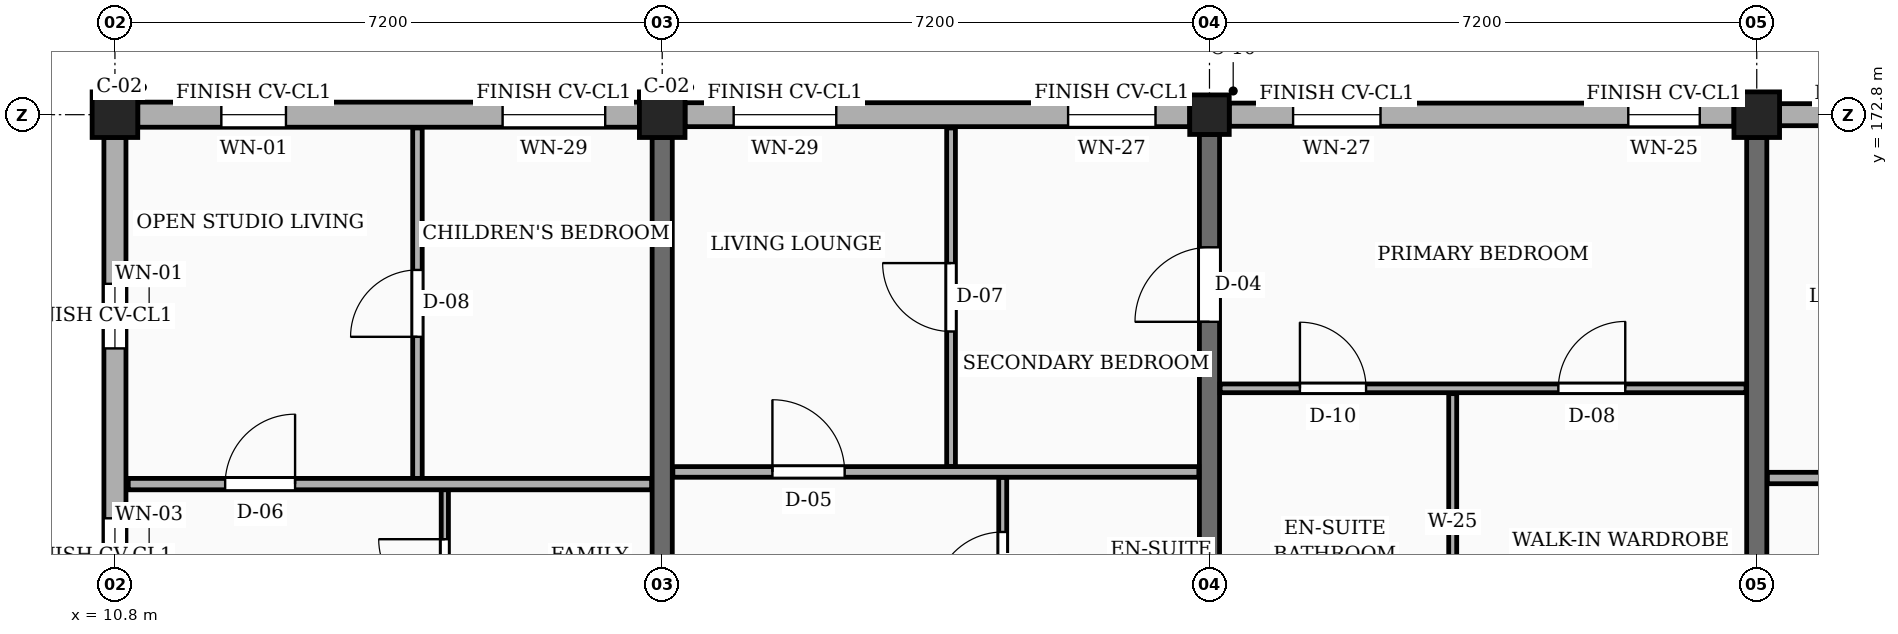
"""IFC4 building model, lengths in metres.
Left out: names, types, materials, properties, quantities, classifications, styles, units other than length and angle.
Written with IfcOpenShell. Run it as: python <this file> out.ifc"""

import sys

from ifc_helpers import new_model, si_unit, direction, frame, frame_2d, origin, origin_2d, place, context, subcontext, project, spatial, rectangle, circle, extrude, element, fill, save


model = new_model("IFC4")
c1 = context("Model", 3, precision=1e-05, world=origin(), true_north=direction((0.0, 1.0)))
c2 = subcontext(c1, "Body", "Model", "MODEL_VIEW")
j1 = project(units=[si_unit("LENGTHUNIT", "METRE"), si_unit("PLANEANGLEUNIT", "RADIAN")], contexts=[c1])
p1 = place(None, origin())
s1 = spatial("IfcSite", under=j1, at=p1, CompositionType="ELEMENT")
p2 = place(p1, origin())
s2 = spatial("IfcBuilding", under=s1, at=p2, CompositionType="ELEMENT")
p3 = place(p2, origin())
s3 = spatial("IfcBuildingStorey", under=s2, at=p3, CompositionType="ELEMENT", Elevation=0.0)
for number, where, z_axis, x_axis in (
    (1, (10.8, 172.8, 0.0), (0.0, 0.0, 1.0), (1.0, 0.0, 0.0)),
    (2, (18.0, 172.8, 0.0), (0.0, 0.0, 1.0), (1.0, 0.0, 0.0)),
):
    element("IfcColumn", number, at=place(p3, frame(where, z_axis=z_axis, x_axis=x_axis)), inside=s3, PredefinedType="COLUMN", context=c2, shape_type="SweptSolid", body=[
        extrude(rectangle(XDim=0.6, YDim=0.6, at=origin_2d()), origin(), (0.0, 0.0, 1.0), 4.5),
    ])
p4 = place(p3, frame((25.2, 172.8, 0.0), z_axis=(0.0, 0.0, 1.0), x_axis=(1.0, 0.0, 0.0)))
e3 = element("IfcColumn", 3, at=p4, inside=s3, PredefinedType="COLUMN", context=c2, shape_type="SweptSolid", body=[
    extrude(circle(Radius=0.26, at=origin_2d()), origin(), (0.0, 0.0, 1.0), 4.5),
])
p5 = place(p3, frame((32.4, 172.8, 0.0), z_axis=(0.0, 0.0, 1.0), x_axis=(1.0, 0.0, 0.0)))
e4 = element("IfcColumn", 4, at=p5, inside=s3, PredefinedType="COLUMN", context=c2, shape_type="SweptSolid", body=[
    extrude(rectangle(XDim=0.6, YDim=0.6, at=origin_2d()), origin(), (0.0, 0.0, 1.0), 4.5),
])
p6 = place(p3, frame((18.0, 165.925, 0.0), z_axis=(0.0, 0.0, 1.0), x_axis=(0.0, 1.0, 0.0)))
e5 = element("IfcWall", 5, at=p6, inside=s3, PredefinedType="SOLIDWALL", context=c2, shape_type="SweptSolid", body=[
    extrude(rectangle(XDim=6.575, YDim=0.265, at=frame_2d((3.288, 0.0))), origin(), (0.0, 0.0, 1.0), 3.535),
])
p7 = place(p3, frame((25.2, 165.925, 0.0), z_axis=(0.0, 0.0, 1.0), x_axis=(0.0, 1.0, 0.0)))
e6 = element("IfcWall", 6, at=p7, inside=s3, PredefinedType="SOLIDWALL", context=c2, shape_type="SweptSolid", body=[
    extrude(rectangle(XDim=6.615, YDim=0.265, at=frame_2d((3.308, 0.0))), origin(), (0.0, 0.0, 1.0), 3.535),
])
p8 = place(p7, frame((4.15, 0.0, 0.0)))
e7 = element("IfcOpeningElement", 7, at=p8, cuts=e6, PredefinedType="OPENING", context=c2, shape_type="SweptSolid", body=[
    extrude(rectangle(XDim=0.98, YDim=2.12, at=frame_2d((0.49, 1.06))), frame((0.0, 0.143, 0.0), z_axis=(0.0, -1.0, 0.0), x_axis=(1.0, 0.0, 0.0)), (0.0, 0.0, 1.0), 0.285),
])
p9 = place(p3, frame((32.4, 165.925, 0.0), z_axis=(0.0, 0.0, 1.0), x_axis=(0.0, 1.0, 0.0)))
e8 = element("IfcWall", 8, at=p9, inside=s3, PredefinedType="SOLIDWALL", context=c2, shape_type="SweptSolid", body=[
    extrude(rectangle(XDim=6.575, YDim=0.265, at=frame_2d((3.288, 0.0))), origin(), (0.0, 0.0, 1.0), 3.535),
])
p10 = place(p3, frame((39.3, 172.8, 0.0), z_axis=(0.0, 0.0, 1.0), x_axis=(-1.0, 0.0, 0.0)))
e9 = element("IfcWall", 9, at=p10, inside=s3, PredefinedType="SOLIDWALL", context=c2, shape_type="SweptSolid", body=[
    extrude(rectangle(XDim=6.6, YDim=0.29, at=frame_2d((3.3, 0.0))), origin(), (0.0, 0.0, 1.0), 3.805),
])
p11 = place(p10, frame((0.45, 0.0, 0.78)))
e10 = element("IfcOpeningElement", 10, at=p11, cuts=e9, PredefinedType="OPENING", context=c2, shape_type="SweptSolid", body=[
    extrude(rectangle(XDim=1.38, YDim=1.36, at=frame_2d((0.69, 0.68))), frame((0.0, 0.155, 0.0), z_axis=(0.0, -1.0, 0.0), x_axis=(1.0, 0.0, 0.0)), (0.0, 0.0, 1.0), 0.31),
])
p12 = place(p10, frame((4.65, 0.0, 0.78)))
e11 = element("IfcOpeningElement", 11, at=p12, cuts=e9, PredefinedType="OPENING", context=c2, shape_type="SweptSolid", body=[
    extrude(rectangle(XDim=0.94, YDim=1.44, at=frame_2d((0.47, 0.72))), frame((0.0, 0.155, 0.0), z_axis=(0.0, -1.0, 0.0), x_axis=(1.0, 0.0, 0.0)), (0.0, 0.0, 1.0), 0.31),
])
p13 = place(p3, frame((32.1, 172.8, 0.0), z_axis=(0.0, 0.0, 1.0), x_axis=(-1.0, 0.0, 0.0)))
e12 = element("IfcWall", 12, at=p13, inside=s3, PredefinedType="SOLIDWALL", context=c2, shape_type="SweptSolid", body=[
    extrude(rectangle(XDim=6.64, YDim=0.305, at=frame_2d((3.32, 0.0))), origin(), (0.0, 0.0, 1.0), 3.805),
])
p14 = place(p13, frame((0.45, 0.0, 0.78)))
e13 = element("IfcOpeningElement", 13, at=p14, cuts=e12, PredefinedType="OPENING", context=c2, shape_type="SweptSolid", body=[
    extrude(rectangle(XDim=0.94, YDim=1.44, at=frame_2d((0.47, 0.72))), frame((0.0, 0.163, 0.0), z_axis=(0.0, -1.0, 0.0), x_axis=(1.0, 0.0, 0.0)), (0.0, 0.0, 1.0), 0.325),
])
p15 = place(p13, frame((4.65, 0.0, 0.78)))
e14 = element("IfcOpeningElement", 14, at=p15, cuts=e12, PredefinedType="OPENING", context=c2, shape_type="SweptSolid", body=[
    extrude(rectangle(XDim=1.15, YDim=1.44, at=frame_2d((0.575, 0.72))), frame((0.0, 0.163, 0.0), z_axis=(0.0, -1.0, 0.0), x_axis=(1.0, 0.0, 0.0)), (0.0, 0.0, 1.0), 0.325),
])
p16 = place(p3, frame((24.94, 172.8, 0.0), z_axis=(0.0, 0.0, 1.0), x_axis=(-1.0, 0.0, 0.0)))
e15 = element("IfcWall", 15, at=p16, inside=s3, PredefinedType="SOLIDWALL", context=c2, shape_type="SweptSolid", body=[
    extrude(rectangle(XDim=6.64, YDim=0.315, at=frame_2d((3.32, 0.0))), origin(), (0.0, 0.0, 1.0), 3.805),
])
p17 = place(p16, frame((0.45, 0.0, 0.78)))
e16 = element("IfcOpeningElement", 16, at=p17, cuts=e15, PredefinedType="OPENING", context=c2, shape_type="SweptSolid", body=[
    extrude(rectangle(XDim=1.15, YDim=1.44, at=frame_2d((0.575, 0.72))), frame((0.0, 0.167, 0.0), z_axis=(0.0, -1.0, 0.0), x_axis=(1.0, 0.0, 0.0)), (0.0, 0.0, 1.0), 0.335),
])
p18 = place(p16, frame((4.65, 0.0, 0.78)))
e17 = element("IfcOpeningElement", 17, at=p18, cuts=e15, PredefinedType="OPENING", context=c2, shape_type="SweptSolid", body=[
    extrude(rectangle(XDim=1.35, YDim=1.44, at=frame_2d((0.675, 0.72))), frame((0.0, 0.167, 0.0), z_axis=(0.0, -1.0, 0.0), x_axis=(1.0, 0.0, 0.0)), (0.0, 0.0, 1.0), 0.335),
])
p19 = place(p3, frame((17.7, 172.8, 0.0), z_axis=(0.0, 0.0, 1.0), x_axis=(-1.0, 0.0, 0.0)))
e18 = element("IfcWall", 18, at=p19, inside=s3, PredefinedType="SOLIDWALL", context=c2, shape_type="SweptSolid", body=[
    extrude(rectangle(XDim=6.6, YDim=0.33, at=frame_2d((3.3, 0.0))), origin(), (0.0, 0.0, 1.0), 3.805),
])
p20 = place(p19, frame((0.45, 0.0, 0.78)))
e19 = element("IfcOpeningElement", 19, at=p20, cuts=e18, PredefinedType="OPENING", context=c2, shape_type="SweptSolid", body=[
    extrude(rectangle(XDim=1.35, YDim=1.44, at=frame_2d((0.675, 0.72))), frame((0.0, 0.175, 0.0), z_axis=(0.0, -1.0, 0.0), x_axis=(1.0, 0.0, 0.0)), (0.0, 0.0, 1.0), 0.35),
])
p21 = place(p19, frame((4.65, 0.0, 0.78)))
e20 = element("IfcOpeningElement", 20, at=p21, cuts=e18, PredefinedType="OPENING", context=c2, shape_type="SweptSolid", body=[
    extrude(rectangle(XDim=0.85, YDim=1.15, at=frame_2d((0.425, 0.575))), frame((0.0, 0.175, 0.0), z_axis=(0.0, -1.0, 0.0), x_axis=(1.0, 0.0, 0.0)), (0.0, 0.0, 1.0), 0.35),
])
p22 = place(p3, frame((10.8, 172.5, 0.0), z_axis=(0.0, 0.0, 1.0), x_axis=(0.0, -1.0, 0.0)))
e21 = element("IfcWall", 21, at=p22, inside=s3, PredefinedType="SOLIDWALL", context=c2, shape_type="SweptSolid", body=[
    extrude(rectangle(XDim=6.6, YDim=0.29, at=frame_2d((3.3, 0.0))), origin(), (0.0, 0.0, 1.0), 3.805),
])
p23 = place(p22, frame((1.925, 0.0, 0.78)))
e22 = element("IfcOpeningElement", 22, at=p23, cuts=e21, PredefinedType="OPENING", context=c2, shape_type="SweptSolid", body=[
    extrude(rectangle(XDim=0.85, YDim=1.15, at=frame_2d((0.425, 0.575))), frame((0.0, 0.155, 0.0), z_axis=(0.0, -1.0, 0.0), x_axis=(1.0, 0.0, 0.0)), (0.0, 0.0, 1.0), 0.31),
])
p24 = place(p22, frame((5.01, 0.0, 0.78)))
e23 = element("IfcOpeningElement", 23, at=p24, cuts=e21, PredefinedType="OPENING", context=c2, shape_type="SweptSolid", body=[
    extrude(rectangle(XDim=1.0, YDim=1.15, at=frame_2d((0.5, 0.575))), frame((0.0, 0.155, 0.0), z_axis=(0.0, -1.0, 0.0), x_axis=(1.0, 0.0, 0.0)), (0.0, 0.0, 1.0), 0.31),
])
p25 = place(p3, frame((14.78, 168.01, 0.0), z_axis=(0.0, 0.0, 1.0), x_axis=(0.0, 1.0, 0.0)))
e24 = element("IfcWall", 24, at=p25, inside=s3, PredefinedType="PARTITIONING", context=c2, shape_type="SweptSolid", body=[
    extrude(rectangle(XDim=4.615, YDim=0.125, at=frame_2d((2.308, 0.0))), origin(), (0.0, 0.0, 1.0), 3.67),
])
p26 = place(p25, frame((1.867, 0.0, 0.0)))
e25 = element("IfcOpeningElement", 25, at=p26, cuts=e24, PredefinedType="OPENING", context=c2, shape_type="SweptSolid", body=[
    extrude(rectangle(XDim=0.88, YDim=2.08, at=frame_2d((0.44, 1.04))), frame((0.0, 0.073, 0.0), z_axis=(0.0, -1.0, 0.0), x_axis=(1.0, 0.0, 0.0)), (0.0, 0.0, 1.0), 0.145),
])
p27 = place(p3, frame((15.14, 165.69, 0.0), z_axis=(0.0, 0.0, 1.0), x_axis=(0.0, 1.0, 0.0)))
e26 = element("IfcWall", 26, at=p27, inside=s3, PredefinedType="PARTITIONING", context=c2, shape_type="SweptSolid", body=[
    extrude(rectangle(XDim=2.18, YDim=0.095, at=frame_2d((1.09, 0.0))), origin(), (0.0, 0.0, 1.0), 3.67),
])
p28 = place(p27, frame((0.655, 0.0, 0.0)))
e27 = element("IfcOpeningElement", 27, at=p28, cuts=e26, PredefinedType="OPENING", context=c2, shape_type="SweptSolid", body=[
    extrude(rectangle(XDim=0.87, YDim=2.05, at=frame_2d((0.435, 1.025))), frame((0.0, 0.058, 0.0), z_axis=(0.0, -1.0, 0.0), x_axis=(1.0, 0.0, 0.0)), (0.0, 0.0, 1.0), 0.115),
])
p29 = place(p3, frame((10.975, 167.94, 0.0), z_axis=(0.0, 0.0, 1.0), x_axis=(1.0, 0.0, 0.0)))
e28 = element("IfcWall", 28, at=p29, inside=s3, PredefinedType="PARTITIONING", context=c2, shape_type="SweptSolid", body=[
    extrude(rectangle(XDim=6.885, YDim=0.15, at=frame_2d((3.442, 0.0))), origin(), (0.0, 0.0, 1.0), 3.67),
])
p30 = place(p29, frame((1.275, 0.0, 0.0)))
e29 = element("IfcOpeningElement", 29, at=p30, cuts=e28, PredefinedType="OPENING", context=c2, shape_type="SweptSolid", body=[
    extrude(rectangle(XDim=0.92, YDim=2.1, at=frame_2d((0.46, 1.05))), frame((0.0, 0.085, 0.0), z_axis=(0.0, -1.0, 0.0), x_axis=(1.0, 0.0, 0.0)), (0.0, 0.0, 1.0), 0.17),
])
p31 = place(p3, frame((21.8, 168.17, 0.0), z_axis=(0.0, 0.0, 1.0), x_axis=(0.0, 1.0, 0.0)))
e30 = element("IfcWall", 30, at=p31, inside=s3, PredefinedType="PARTITIONING", context=c2, shape_type="SweptSolid", body=[
    extrude(rectangle(XDim=4.455, YDim=0.115, at=frame_2d((2.228, 0.0))), origin(), (0.0, 0.0, 1.0), 3.67),
])
p32 = place(p31, frame((1.778, 0.0, 0.0)))
e31 = element("IfcOpeningElement", 31, at=p32, cuts=e30, PredefinedType="OPENING", context=c2, shape_type="SweptSolid", body=[
    extrude(rectangle(XDim=0.9, YDim=2.1, at=frame_2d((0.45, 1.05))), frame((0.0, 0.067, 0.0), z_axis=(0.0, -1.0, 0.0), x_axis=(1.0, 0.0, 0.0)), (0.0, 0.0, 1.0), 0.135),
])
p33 = place(p3, frame((22.48, 165.69, 0.0), z_axis=(0.0, 0.0, 1.0), x_axis=(0.0, 1.0, 0.0)))
e32 = element("IfcWall", 32, at=p33, inside=s3, PredefinedType="PARTITIONING", context=c2, shape_type="SweptSolid", body=[
    extrude(rectangle(XDim=2.34, YDim=0.105, at=frame_2d((1.17, 0.0))), origin(), (0.0, 0.0, 1.0), 3.67),
])
p34 = place(p33, frame((0.72, 0.0, 0.0)))
e33 = element("IfcOpeningElement", 33, at=p34, cuts=e32, PredefinedType="OPENING", context=c2, shape_type="SweptSolid", body=[
    extrude(rectangle(XDim=0.9, YDim=2.05, at=frame_2d((0.45, 1.025))), frame((0.0, 0.062, 0.0), z_axis=(0.0, -1.0, 0.0), x_axis=(1.0, 0.0, 0.0)), (0.0, 0.0, 1.0), 0.125),
])
p35 = place(p3, frame((18.14, 168.1, 0.0), z_axis=(0.0, 0.0, 1.0), x_axis=(1.0, 0.0, 0.0)))
e34 = element("IfcWall", 34, at=p35, inside=s3, PredefinedType="PARTITIONING", context=c2, shape_type="SweptSolid", body=[
    extrude(rectangle(XDim=6.92, YDim=0.14, at=frame_2d((3.46, 0.0))), origin(), (0.0, 0.0, 1.0), 3.67),
])
p36 = place(p35, frame((1.31, 0.0, 0.0)))
e35 = element("IfcOpeningElement", 35, at=p36, cuts=e34, PredefinedType="OPENING", context=c2, shape_type="SweptSolid", body=[
    extrude(rectangle(XDim=0.95, YDim=2.1, at=frame_2d((0.475, 1.05))), frame((0.0, 0.08, 0.0), z_axis=(0.0, -1.0, 0.0), x_axis=(1.0, 0.0, 0.0)), (0.0, 0.0, 1.0), 0.16),
])
p37 = place(p3, frame((25.34, 169.2, 0.0), z_axis=(0.0, 0.0, 1.0), x_axis=(1.0, 0.0, 0.0)))
e36 = element("IfcWall", 36, at=p37, inside=s3, PredefinedType="PARTITIONING", context=c2, shape_type="SweptSolid", body=[
    extrude(rectangle(XDim=6.92, YDim=0.115, at=frame_2d((3.46, 0.0))), origin(), (0.0, 0.0, 1.0), 3.67),
])
p38 = place(p37, frame((1.05, 0.0, 0.0)))
e37 = element("IfcOpeningElement", 37, at=p38, cuts=e36, PredefinedType="OPENING", context=c2, shape_type="SweptSolid", body=[
    extrude(rectangle(XDim=0.87, YDim=2.05, at=frame_2d((0.435, 1.025))), frame((0.0, 0.067, 0.0), z_axis=(0.0, -1.0, 0.0), x_axis=(1.0, 0.0, 0.0)), (0.0, 0.0, 1.0), 0.135),
])
p39 = place(p37, frame((4.45, 0.0, 0.0)))
e38 = element("IfcOpeningElement", 38, at=p39, cuts=e36, PredefinedType="OPENING", context=c2, shape_type="SweptSolid", body=[
    extrude(rectangle(XDim=0.88, YDim=2.08, at=frame_2d((0.44, 1.04))), frame((0.0, 0.067, 0.0), z_axis=(0.0, -1.0, 0.0), x_axis=(1.0, 0.0, 0.0)), (0.0, 0.0, 1.0), 0.135),
])
p40 = place(p3, frame((28.4, 165.74, 0.0), z_axis=(0.0, 0.0, 1.0), x_axis=(0.0, 1.0, 0.0)))
e39 = element("IfcWall", 39, at=p40, inside=s3, PredefinedType="PARTITIONING", context=c2, shape_type="SweptSolid", body=[
    extrude(rectangle(XDim=3.39, YDim=0.105, at=frame_2d((1.695, 0.0))), origin(), (0.0, 0.0, 1.0), 3.67),
])
p41 = place(p3, frame((32.54, 168.02, 0.0), z_axis=(0.0, 0.0, 1.0), x_axis=(1.0, 0.0, 0.0)))
e40 = element("IfcWall", 40, at=p41, inside=s3, PredefinedType="PARTITIONING", context=c2, shape_type="SweptSolid", body=[
    extrude(rectangle(XDim=6.92, YDim=0.15, at=frame_2d((3.46, 0.0))), origin(), (0.0, 0.0, 1.0), 3.67),
])
p42 = place(p41, frame((1.31, 0.0, 0.0)))
e41 = element("IfcOpeningElement", 41, at=p42, cuts=e40, PredefinedType="OPENING", context=c2, shape_type="SweptSolid", body=[
    extrude(rectangle(XDim=0.92, YDim=2.1, at=frame_2d((0.46, 1.05))), frame((0.0, 0.085, 0.0), z_axis=(0.0, -1.0, 0.0), x_axis=(1.0, 0.0, 0.0)), (0.0, 0.0, 1.0), 0.17),
])
p43 = place(p14, origin())
e42 = element("IfcWindow", 42, at=p43, inside=s3, PartitioningType="SINGLE_PANEL", PredefinedType="WINDOW", context=c2, shape_type="SweptSolid", body=[
    extrude(rectangle(XDim=0.94, YDim=1.44, at=frame_2d((0.47, 0.72))), frame((0.0, 0.03, 0.0), z_axis=(0.0, -1.0, 0.0), x_axis=(1.0, 0.0, 0.0)), (0.0, 0.0, 1.0), 0.06),
])
fill(e13, e42)
p44 = place(p15, origin())
e43 = element("IfcWindow", 43, at=p44, inside=s3, PartitioningType="SINGLE_PANEL", PredefinedType="WINDOW", context=c2, shape_type="SweptSolid", body=[
    extrude(rectangle(XDim=1.15, YDim=1.44, at=frame_2d((0.575, 0.72))), frame((0.0, 0.03, 0.0), z_axis=(0.0, -1.0, 0.0), x_axis=(1.0, 0.0, 0.0)), (0.0, 0.0, 1.0), 0.06),
])
fill(e14, e43)
p45 = place(p17, origin())
e44 = element("IfcWindow", 44, at=p45, inside=s3, PartitioningType="SINGLE_PANEL", PredefinedType="WINDOW", context=c2, shape_type="SweptSolid", body=[
    extrude(rectangle(XDim=1.15, YDim=1.44, at=frame_2d((0.575, 0.72))), frame((0.0, 0.03, 0.0), z_axis=(0.0, -1.0, 0.0), x_axis=(1.0, 0.0, 0.0)), (0.0, 0.0, 1.0), 0.06),
])
fill(e16, e44)
p46 = place(p18, origin())
e45 = element("IfcWindow", 45, at=p46, inside=s3, PartitioningType="SINGLE_PANEL", PredefinedType="WINDOW", context=c2, shape_type="SweptSolid", body=[
    extrude(rectangle(XDim=1.35, YDim=1.44, at=frame_2d((0.675, 0.72))), frame((0.0, 0.03, 0.0), z_axis=(0.0, -1.0, 0.0), x_axis=(1.0, 0.0, 0.0)), (0.0, 0.0, 1.0), 0.06),
])
fill(e17, e45)
p47 = place(p20, origin())
e46 = element("IfcWindow", 46, at=p47, inside=s3, PartitioningType="SINGLE_PANEL", PredefinedType="WINDOW", context=c2, shape_type="SweptSolid", body=[
    extrude(rectangle(XDim=1.35, YDim=1.44, at=frame_2d((0.675, 0.72))), frame((0.0, 0.03, 0.0), z_axis=(0.0, -1.0, 0.0), x_axis=(1.0, 0.0, 0.0)), (0.0, 0.0, 1.0), 0.06),
])
fill(e19, e46)
p48 = place(p21, origin())
e47 = element("IfcWindow", 47, at=p48, inside=s3, PartitioningType="SINGLE_PANEL", PredefinedType="WINDOW", context=c2, shape_type="SweptSolid", body=[
    extrude(rectangle(XDim=0.85, YDim=1.15, at=frame_2d((0.425, 0.575))), frame((0.0, 0.03, 0.0), z_axis=(0.0, -1.0, 0.0), x_axis=(1.0, 0.0, 0.0)), (0.0, 0.0, 1.0), 0.06),
])
fill(e20, e47)
p49 = place(p23, origin())
e48 = element("IfcWindow", 48, at=p49, inside=s3, PartitioningType="SINGLE_PANEL", PredefinedType="WINDOW", context=c2, shape_type="SweptSolid", body=[
    extrude(rectangle(XDim=0.85, YDim=1.15, at=frame_2d((0.425, 0.575))), frame((0.0, 0.03, 0.0), z_axis=(0.0, -1.0, 0.0), x_axis=(1.0, 0.0, 0.0)), (0.0, 0.0, 1.0), 0.06),
])
fill(e22, e48)
p50 = place(p24, origin())
e49 = element("IfcWindow", 49, at=p50, inside=s3, PartitioningType="SINGLE_PANEL", PredefinedType="WINDOW", context=c2, shape_type="SweptSolid", body=[
    extrude(rectangle(XDim=1.0, YDim=1.15, at=frame_2d((0.5, 0.575))), frame((0.0, 0.03, 0.0), z_axis=(0.0, -1.0, 0.0), x_axis=(1.0, 0.0, 0.0)), (0.0, 0.0, 1.0), 0.06),
])
fill(e23, e49)
p51 = place(p26, origin())
e50 = element("IfcDoor", 50, at=p51, inside=s3, OperationType="SINGLE_SWING_LEFT", PredefinedType="DOOR", context=c2, shape_type="SweptSolid", body=[
    extrude(rectangle(XDim=0.88, YDim=2.08, at=frame_2d((0.44, 1.04))), frame((0.0, 0.025, 0.0), z_axis=(0.0, -1.0, 0.0), x_axis=(1.0, 0.0, 0.0)), (0.0, 0.0, 1.0), 0.05),
])
fill(e25, e50)
p52 = place(p28, origin())
e51 = element("IfcDoor", 51, at=p52, inside=s3, OperationType="SINGLE_SWING_RIGHT", PredefinedType="DOOR", context=c2, shape_type="SweptSolid", body=[
    extrude(rectangle(XDim=0.87, YDim=2.05, at=frame_2d((0.435, 1.025))), frame((0.0, 0.025, 0.0), z_axis=(0.0, -1.0, 0.0), x_axis=(1.0, 0.0, 0.0)), (0.0, 0.0, 1.0), 0.05),
])
fill(e27, e51)
p53 = place(p30, origin())
e52 = element("IfcDoor", 52, at=p53, inside=s3, OperationType="SINGLE_SWING_RIGHT", PredefinedType="DOOR", context=c2, shape_type="SweptSolid", body=[
    extrude(rectangle(XDim=0.92, YDim=2.1, at=frame_2d((0.46, 1.05))), frame((0.0, 0.025, 0.0), z_axis=(0.0, -1.0, 0.0), x_axis=(1.0, 0.0, 0.0)), (0.0, 0.0, 1.0), 0.05),
])
fill(e29, e52)
p54 = place(p32, origin())
e53 = element("IfcDoor", 53, at=p54, inside=s3, OperationType="SINGLE_SWING_RIGHT", PredefinedType="DOOR", context=c2, shape_type="SweptSolid", body=[
    extrude(rectangle(XDim=0.9, YDim=2.1, at=frame_2d((0.45, 1.05))), frame((0.0, 0.025, 0.0), z_axis=(0.0, -1.0, 0.0), x_axis=(1.0, 0.0, 0.0)), (0.0, 0.0, 1.0), 0.05),
])
fill(e31, e53)
p55 = place(p34, origin())
e54 = element("IfcDoor", 54, at=p55, inside=s3, OperationType="SINGLE_SWING_LEFT", PredefinedType="DOOR", context=c2, shape_type="SweptSolid", body=[
    extrude(rectangle(XDim=0.9, YDim=2.05, at=frame_2d((0.45, 1.025))), frame((0.0, 0.025, 0.0), z_axis=(0.0, -1.0, 0.0), x_axis=(1.0, 0.0, 0.0)), (0.0, 0.0, 1.0), 0.05),
])
fill(e33, e54)
p56 = place(p36, origin())
e55 = element("IfcDoor", 55, at=p56, inside=s3, OperationType="SINGLE_SWING_LEFT", PredefinedType="DOOR", context=c2, shape_type="SweptSolid", body=[
    extrude(rectangle(XDim=0.95, YDim=2.1, at=frame_2d((0.475, 1.05))), frame((0.0, 0.025, 0.0), z_axis=(0.0, -1.0, 0.0), x_axis=(1.0, 0.0, 0.0)), (0.0, 0.0, 1.0), 0.05),
])
fill(e35, e55)
p57 = place(p38, origin())
e56 = element("IfcDoor", 56, at=p57, inside=s3, OperationType="SINGLE_SWING_LEFT", PredefinedType="DOOR", context=c2, shape_type="SweptSolid", body=[
    extrude(rectangle(XDim=0.87, YDim=2.05, at=frame_2d((0.435, 1.025))), frame((0.0, 0.025, 0.0), z_axis=(0.0, -1.0, 0.0), x_axis=(1.0, 0.0, 0.0)), (0.0, 0.0, 1.0), 0.05),
])
fill(e37, e56)
p58 = place(p39, origin())
e57 = element("IfcDoor", 57, at=p58, inside=s3, OperationType="SINGLE_SWING_RIGHT", PredefinedType="DOOR", context=c2, shape_type="SweptSolid", body=[
    extrude(rectangle(XDim=0.88, YDim=2.08, at=frame_2d((0.44, 1.04))), frame((0.0, 0.025, 0.0), z_axis=(0.0, -1.0, 0.0), x_axis=(1.0, 0.0, 0.0)), (0.0, 0.0, 1.0), 0.05),
])
fill(e38, e57)
p59 = place(p8, origin())
e58 = element("IfcDoor", 58, at=p59, inside=s3, OperationType="SINGLE_SWING_LEFT", PredefinedType="DOOR", context=c2, shape_type="SweptSolid", body=[
    extrude(rectangle(XDim=0.98, YDim=2.12, at=frame_2d((0.49, 1.06))), frame((0.0, 0.025, 0.0), z_axis=(0.0, -1.0, 0.0), x_axis=(1.0, 0.0, 0.0)), (0.0, 0.0, 1.0), 0.05),
])
fill(e7, e58)
save(model, sys.argv[1])
